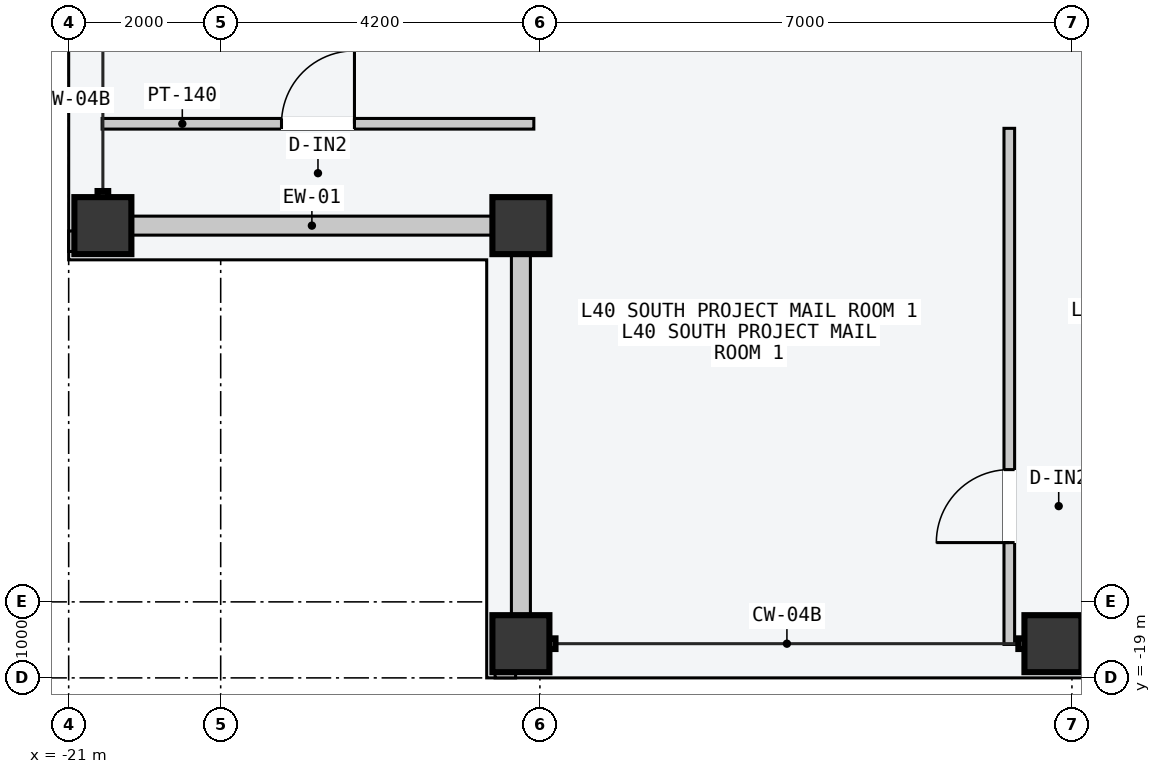
"""IFC4 building model, lengths in metres.
Left out: names, types, materials, properties, quantities, classifications, styles, units other than length and angle.
Written with IfcOpenShell. Run it as: python <this file> out.ifc"""

import sys

from ifc_helpers import new_model, si_unit, direction, frame, frame_2d, origin, origin_2d, place, context, subcontext, project, spatial, rectangle, hollow_rectangle, extrude, element, fill, save


model = new_model("IFC4")
c1 = context("Model", 3, precision=1e-05, world=origin(), true_north=direction((0.0, 1.0)))
c2 = subcontext(c1, "Body", "Model", "MODEL_VIEW")
j1 = project(units=[si_unit("LENGTHUNIT", "METRE"), si_unit("PLANEANGLEUNIT", "RADIAN")], contexts=[c1])
p1 = place(None, origin())
s1 = spatial("IfcSite", under=j1, at=p1, CompositionType="ELEMENT")
p2 = place(p1, origin())
s2 = spatial("IfcBuilding", under=s1, at=p2, CompositionType="ELEMENT")
p3 = place(p2, frame((0.0, 0.0, 155.1)))
s3 = spatial("IfcBuildingStorey", under=s2, at=p3, CompositionType="ELEMENT", Elevation=155.1)
for number, where, z_axis, x_axis in (
    (1, (-15.05, -18.55, 0.0), (0.0, 0.0, 1.0), (1.0, 0.0, 0.0)),
    (2, (-8.05, -18.55, 0.0), (0.0, 0.0, 1.0), (1.0, 0.0, 0.0)),
    (3, (-20.55, -13.05, 0.0), (0.0, 0.0, 1.0), (0.0, 1.0, 0.0)),
    (4, (-15.05, -13.05, 0.0), (0.0, 0.0, 1.0), (1.0, 0.0, 0.0)),
):
    element("IfcColumn", number, at=place(p3, frame(where, z_axis=z_axis, x_axis=x_axis)), inside=s3, PredefinedType="COLUMN", context=c2, shape_type="SweptSolid", body=[
        extrude(hollow_rectangle(XDim=0.75, YDim=0.75, WallThickness=0.032, at=origin_2d()), origin(), (0.0, 0.0, 1.0), 3.6),
    ])
for number, where, z_axis, x_axis in (
    (5, (-20.165, -13.05, 0.0), (0.0, 0.0, 1.0), (1.0, 0.0, 0.0)),
    (6, (-15.05, -18.165, 0.0), (0.0, 0.0, 1.0), (0.0, 1.0, 0.0)),
):
    element("IfcWall", number, at=place(p3, frame(where, z_axis=z_axis, x_axis=x_axis)), inside=s3, PredefinedType="STANDARD", context=c2, shape_type="SweptSolid", body=[
        extrude(rectangle(XDim=4.73, YDim=0.25, at=frame_2d((2.365, 0.0))), origin(), (0.0, 0.0, 1.0), 2.75),
    ])
for number, where, z_axis, x_axis in (
    (7, (-15.39, -18.89, 0.0), (0.0, 0.0, 1.0), (1.0, 0.0, 0.0)),
    (8, (-20.89, -13.39, 0.0), (0.0, 0.0, 1.0), (0.0, 1.0, 0.0)),
):
    element("IfcWall", number, at=place(p3, frame(where, z_axis=z_axis, x_axis=x_axis)), inside=s3, PredefinedType="PARAPET", context=c2, shape_type="SweptSolid", body=[
        extrude(rectangle(XDim=0.27, YDim=0.22, at=frame_2d((0.135, 0.0))), origin(), (0.0, 0.0, 1.0), 1.2),
    ])
p4 = place(p3, frame((-8.624, -18.56, 0.0), z_axis=(0.0, 0.0, 1.0), x_axis=(0.0, 1.0, 0.0)))
e9 = element("IfcWall", 9, at=p4, inside=s3, PredefinedType="PARTITIONING", context=c2, shape_type="SweptSolid", body=[
    extrude(rectangle(XDim=6.79, YDim=0.14, at=frame_2d((3.395, 0.0))), origin(), (0.0, 0.0, 1.0), 3.4),
])
p5 = place(p4, frame((1.34, 0.0, 0.0)))
e10 = element("IfcOpeningElement", 10, at=p5, cuts=e9, PredefinedType="OPENING", context=c2, shape_type="SweptSolid", body=[
    extrude(rectangle(XDim=0.96, YDim=2.18, at=frame_2d((0.48, 1.09))), frame((0.0, 0.08, 0.0), z_axis=(0.0, -1.0, 0.0), x_axis=(1.0, 0.0, 0.0)), (0.0, 0.0, 1.0), 0.16),
])
p6 = place(p3, frame((-20.56, -11.71, 0.0), z_axis=(0.0, 0.0, 1.0), x_axis=(1.0, 0.0, 0.0)))
e11 = element("IfcWall", 11, at=p6, inside=s3, PredefinedType="PARTITIONING", context=c2, shape_type="SweptSolid", body=[
    extrude(rectangle(XDim=5.68, YDim=0.14, at=frame_2d((2.84, 0.0))), origin(), (0.0, 0.0, 1.0), 3.4),
])
p7 = place(p6, frame((2.36, 0.0, 0.0)))
e12 = element("IfcOpeningElement", 12, at=p7, cuts=e11, PredefinedType="OPENING", context=c2, shape_type="SweptSolid", body=[
    extrude(rectangle(XDim=0.96, YDim=2.18, at=frame_2d((0.48, 1.09))), frame((0.0, 0.08, 0.0), z_axis=(0.0, -1.0, 0.0), x_axis=(1.0, 0.0, 0.0)), (0.0, 0.0, 1.0), 0.16),
])
p8 = place(p5, origin())
e13 = element("IfcDoor", 13, at=p8, inside=s3, OperationType="SINGLE_SWING_LEFT", PredefinedType="DOOR", context=c2, shape_type="SweptSolid", body=[
    extrude(rectangle(XDim=0.96, YDim=2.18, at=frame_2d((0.48, 1.09))), frame((0.0, 0.025, 0.0), z_axis=(0.0, -1.0, 0.0), x_axis=(1.0, 0.0, 0.0)), (0.0, 0.0, 1.0), 0.05),
])
fill(e10, e13)
p9 = place(p7, origin())
e14 = element("IfcDoor", 14, at=p9, inside=s3, OperationType="SINGLE_SWING_RIGHT", PredefinedType="DOOR", context=c2, shape_type="SweptSolid", body=[
    extrude(rectangle(XDim=0.96, YDim=2.18, at=frame_2d((0.48, 1.09))), frame((0.0, 0.025, 0.0), z_axis=(0.0, -1.0, 0.0), x_axis=(1.0, 0.0, 0.0)), (0.0, 0.0, 1.0), 0.05),
])
fill(e12, e14)
save(model, sys.argv[1])
